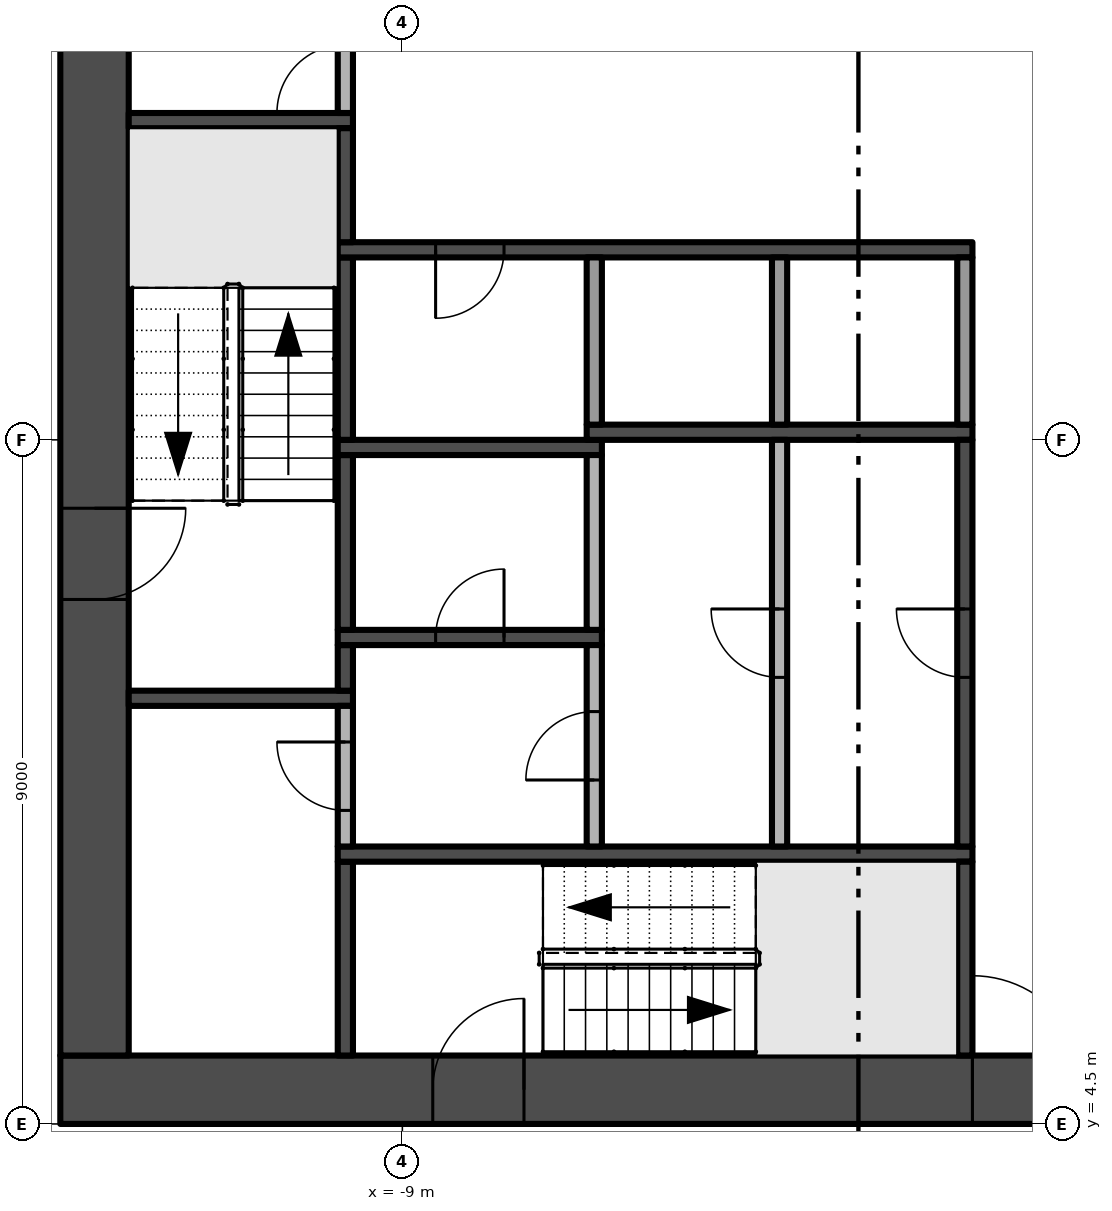
"""IFC4 building model, lengths in metres.
Left out: names, types, materials, properties, quantities, classifications, styles, units other than length and angle.
Written with IfcOpenShell. Run it as: python <this file> out.ifc"""

import sys

from ifc_helpers import new_model, si_unit, direction, frame, frame_2d, origin, place, context, subcontext, project, spatial, rectangle, extrude, element, fill, save


model = new_model("IFC4")
c1 = context("Model", 3, precision=1e-05, world=origin(), true_north=direction((0.0, 1.0)))
c2 = subcontext(c1, "Body", "Model", "MODEL_VIEW")
j1 = project(units=[si_unit("LENGTHUNIT", "METRE"), si_unit("PLANEANGLEUNIT", "RADIAN")], contexts=[c1])
p1 = place(None, origin())
s1 = spatial("IfcSite", under=j1, at=p1, CompositionType="ELEMENT")
p2 = place(p1, origin())
s2 = spatial("IfcBuilding", under=s1, at=p2, CompositionType="ELEMENT")
p3 = place(p2, frame((0.0, 0.0, 41.6)))
s3 = spatial("IfcBuildingStorey", under=s2, at=p3, CompositionType="ELEMENT", Elevation=41.6)
p4 = place(p3, frame((-13.5, 4.95, -0.3), z_axis=(0.0, 0.0, 1.0), x_axis=(1.0, 0.0, 0.0)))
e1 = element("IfcWall", 1, at=p4, inside=s3, PredefinedType="SHEAR", context=c2, shape_type="SweptSolid", body=[
    extrude(rectangle(XDim=27.0, YDim=0.9, at=frame_2d((13.5, 0.0))), origin(), (0.0, 0.0, 1.0), 3.8),
])
p5 = place(p4, frame((12.0, 0.0, 0.3)))
e2 = element("IfcOpeningElement", 2, at=p5, cuts=e1, PredefinedType="OPENING", context=c2, shape_type="SweptSolid", body=[
    extrude(rectangle(XDim=3.0, YDim=2.4, at=frame_2d((1.5, 1.2))), frame((0.0, 0.46, 0.0), z_axis=(0.0, -1.0, 0.0), x_axis=(1.0, 0.0, 0.0)), (0.0, 0.0, 1.0), 0.92),
])
p6 = place(p4, frame((4.9, 0.0, 0.3)))
e3 = element("IfcOpeningElement", 3, at=p6, cuts=e1, PredefinedType="OPENING", context=c2, shape_type="SweptSolid", body=[
    extrude(rectangle(XDim=1.2, YDim=2.2, at=frame_2d((0.6, 1.1))), frame((0.0, 0.46, 0.0), z_axis=(0.0, -1.0, 0.0), x_axis=(1.0, 0.0, 0.0)), (0.0, 0.0, 1.0), 0.92),
])
p7 = place(p4, frame((20.75, 0.0, 0.3)))
e4 = element("IfcOpeningElement", 4, at=p7, cuts=e1, PredefinedType="OPENING", context=c2, shape_type="SweptSolid", body=[
    extrude(rectangle(XDim=1.5, YDim=2.2, at=frame_2d((0.75, 1.1))), frame((0.0, 0.46, 0.0), z_axis=(0.0, -1.0, 0.0), x_axis=(1.0, 0.0, 0.0)), (0.0, 0.0, 1.0), 0.92),
])
p8 = place(p4, frame((17.4, 0.0, 0.3)))
e5 = element("IfcOpeningElement", 5, at=p8, cuts=e1, PredefinedType="OPENING", context=c2, shape_type="SweptSolid", body=[
    extrude(rectangle(XDim=1.2, YDim=2.2, at=frame_2d((0.6, 1.1))), frame((0.0, 0.46, 0.0), z_axis=(0.0, -1.0, 0.0), x_axis=(1.0, 0.0, 0.0)), (0.0, 0.0, 1.0), 0.92),
])
p9 = place(p3, frame((-13.05, 21.6, -0.3), z_axis=(0.0, 0.0, 1.0), x_axis=(0.0, -1.0, 0.0)))
e6 = element("IfcWall", 6, at=p9, inside=s3, PredefinedType="SHEAR", context=c2, shape_type="SweptSolid", body=[
    extrude(rectangle(XDim=16.2, YDim=0.9, at=frame_2d((8.1, 0.0))), origin(), (0.0, 0.0, 1.0), 3.8),
])
p10 = place(p9, frame((9.0, 0.0, 0.3)))
e7 = element("IfcOpeningElement", 7, at=p10, cuts=e6, PredefinedType="OPENING", context=c2, shape_type="SweptSolid", body=[
    extrude(rectangle(XDim=1.2, YDim=2.2, at=frame_2d((0.6, 1.1))), frame((0.0, 0.46, 0.0), z_axis=(0.0, -1.0, 0.0), x_axis=(1.0, 0.0, 0.0)), (0.0, 0.0, 1.0), 0.92),
])
for number, where, z_axis, x_axis in (
    (8, (-12.6, 10.1, 0.0), (0.0, 0.0, 1.0), (1.0, 0.0, 0.0)),
    (9, (-12.6, 17.7, 0.0), (0.0, 0.0, 1.0), (1.0, 0.0, 0.0)),
):
    element("IfcWall", number, at=place(p3, frame(where, z_axis=z_axis, x_axis=x_axis)), inside=s3, PredefinedType="SHEAR", context=c2, shape_type="SweptSolid", body=[
        extrude(rectangle(XDim=2.95, YDim=0.2, at=frame_2d((1.475, 0.0))), origin(), (0.0, 0.0, 1.0), 3.5),
    ])
p11 = place(p3, frame((-9.75, 5.4, 0.0), z_axis=(0.0, 0.0, 1.0), x_axis=(0.0, 1.0, 0.0)))
e10 = element("IfcWall", 10, at=p11, inside=s3, PredefinedType="SHEAR", context=c2, shape_type="SweptSolid", body=[
    extrude(rectangle(XDim=2.55, YDim=0.2, at=frame_2d((1.275, 0.0))), origin(), (0.0, 0.0, 1.0), 3.5),
])
p12 = place(p3, frame((-9.85, 8.05, 0.0), z_axis=(0.0, 0.0, 1.0), x_axis=(1.0, 0.0, 0.0)))
e11 = element("IfcWall", 11, at=p12, inside=s3, PredefinedType="SHEAR", context=c2, shape_type="SweptSolid", body=[
    extrude(rectangle(XDim=8.35, YDim=0.2, at=frame_2d((4.175, 0.0))), origin(), (0.0, 0.0, 1.0), 3.5),
])
p13 = place(p3, frame((-9.75, 8.15, 0.0), z_axis=(0.0, 0.0, 1.0), x_axis=(0.0, 1.0, 0.0)))
e12 = element("IfcWall", 12, at=p13, inside=s3, PredefinedType="PARTITIONING", context=c2, shape_type="SweptSolid", body=[
    extrude(rectangle(XDim=1.85, YDim=0.2, at=frame_2d((0.925, 0.0))), origin(), (0.0, 0.0, 1.0), 3.5),
])
p14 = place(p13, frame((0.475, 0.0, 0.0)))
e13 = element("IfcOpeningElement", 13, at=p14, cuts=e12, PredefinedType="OPENING", context=c2, shape_type="SweptSolid", body=[
    extrude(rectangle(XDim=0.9, YDim=2.1, at=frame_2d((0.45, 1.05))), frame((0.0, 0.11, 0.0), z_axis=(0.0, -1.0, 0.0), x_axis=(1.0, 0.0, 0.0)), (0.0, 0.0, 1.0), 0.22),
])
p15 = place(p3, frame((-9.75, 10.2, 0.0), z_axis=(0.0, 0.0, 1.0), x_axis=(0.0, 1.0, 0.0)))
e14 = element("IfcWall", 14, at=p15, inside=s3, PredefinedType="SHEAR", context=c2, shape_type="SweptSolid", body=[
    extrude(rectangle(XDim=0.6, YDim=0.2, at=frame_2d((0.3, 0.0))), origin(), (0.0, 0.0, 1.0), 3.5),
])
p16 = place(p3, frame((-9.85, 10.9, 0.0), z_axis=(0.0, 0.0, 1.0), x_axis=(1.0, 0.0, 0.0)))
e15 = element("IfcWall", 15, at=p16, inside=s3, PredefinedType="SHEAR", context=c2, shape_type="SweptSolid", body=[
    extrude(rectangle(XDim=3.475, YDim=0.2, at=frame_2d((1.738, 0.0))), origin(), (0.0, 0.0, 1.0), 3.5),
])
p17 = place(p16, frame((1.288, 0.0, 0.0)))
e16 = element("IfcOpeningElement", 16, at=p17, cuts=e15, PredefinedType="OPENING", context=c2, shape_type="SweptSolid", body=[
    extrude(rectangle(XDim=0.9, YDim=2.1, at=frame_2d((0.45, 1.05))), frame((0.0, 0.11, 0.0), z_axis=(0.0, -1.0, 0.0), x_axis=(1.0, 0.0, 0.0)), (0.0, 0.0, 1.0), 0.22),
])
p18 = place(p3, frame((-9.75, 11.0, 0.0), z_axis=(0.0, 0.0, 1.0), x_axis=(0.0, 1.0, 0.0)))
e17 = element("IfcWall", 17, at=p18, inside=s3, PredefinedType="SHEAR", context=c2, shape_type="SweptSolid", body=[
    extrude(rectangle(XDim=2.3, YDim=0.2, at=frame_2d((1.15, 0.0))), origin(), (0.0, 0.0, 1.0), 3.5),
])
p19 = place(p3, frame((-9.85, 13.4, 0.0), z_axis=(0.0, 0.0, 1.0), x_axis=(1.0, 0.0, 0.0)))
e18 = element("IfcWall", 18, at=p19, inside=s3, PredefinedType="SHEAR", context=c2, shape_type="SweptSolid", body=[
    extrude(rectangle(XDim=3.475, YDim=0.2, at=frame_2d((1.738, 0.0))), origin(), (0.0, 0.0, 1.0), 3.5),
])
p20 = place(p3, frame((-9.75, 13.5, 0.0), z_axis=(0.0, 0.0, 1.0), x_axis=(0.0, 1.0, 0.0)))
e19 = element("IfcWall", 19, at=p20, inside=s3, PredefinedType="SHEAR", context=c2, shape_type="SweptSolid", body=[
    extrude(rectangle(XDim=2.4, YDim=0.2, at=frame_2d((1.2, 0.0))), origin(), (0.0, 0.0, 1.0), 3.5),
])
p21 = place(p3, frame((-1.5, 16.0, 0.0), z_axis=(0.0, 0.0, 1.0), x_axis=(-1.0, 0.0, 0.0)))
e20 = element("IfcWall", 20, at=p21, inside=s3, PredefinedType="SHEAR", context=c2, shape_type="SweptSolid", body=[
    extrude(rectangle(XDim=8.35, YDim=0.2, at=frame_2d((4.175, 0.0))), origin(), (0.0, 0.0, 1.0), 3.5),
])
p22 = place(p21, frame((6.162, 0.0, 0.0)))
e21 = element("IfcOpeningElement", 21, at=p22, cuts=e20, PredefinedType="OPENING", context=c2, shape_type="SweptSolid", body=[
    extrude(rectangle(XDim=0.9, YDim=2.1, at=frame_2d((0.45, 1.05))), frame((0.0, 0.11, 0.0), z_axis=(0.0, -1.0, 0.0), x_axis=(1.0, 0.0, 0.0)), (0.0, 0.0, 1.0), 0.22),
])
p23 = place(p3, frame((-9.75, 16.1, 0.0), z_axis=(0.0, 0.0, 1.0), x_axis=(0.0, 1.0, 0.0)))
e22 = element("IfcWall", 22, at=p23, inside=s3, PredefinedType="SHEAR", context=c2, shape_type="SweptSolid", body=[
    extrude(rectangle(XDim=1.5, YDim=0.2, at=frame_2d((0.75, 0.0))), origin(), (0.0, 0.0, 1.0), 3.5),
])
p24 = place(p3, frame((-9.75, 17.8, 0.0), z_axis=(0.0, 0.0, 1.0), x_axis=(0.0, 1.0, 0.0)))
e23 = element("IfcWall", 23, at=p24, inside=s3, PredefinedType="PARTITIONING", context=c2, shape_type="SweptSolid", body=[
    extrude(rectangle(XDim=1.4, YDim=0.2, at=frame_2d((0.7, 0.0))), origin(), (0.0, 0.0, 1.0), 3.5),
])
p25 = place(p24, origin())
e24 = element("IfcOpeningElement", 24, at=p25, cuts=e23, PredefinedType="OPENING", context=c2, shape_type="SweptSolid", body=[
    extrude(rectangle(XDim=0.9, YDim=2.1, at=frame_2d((0.45, 1.05))), frame((0.0, 0.11, 0.0), z_axis=(0.0, -1.0, 0.0), x_axis=(1.0, 0.0, 0.0)), (0.0, 0.0, 1.0), 0.22),
])
p26 = place(p3, frame((-6.475, 8.15, 0.0), z_axis=(0.0, 0.0, 1.0), x_axis=(0.0, 1.0, 0.0)))
e25 = element("IfcWall", 25, at=p26, inside=s3, PredefinedType="PARTITIONING", context=c2, shape_type="SweptSolid", body=[
    extrude(rectangle(XDim=2.65, YDim=0.2, at=frame_2d((1.325, 0.0))), origin(), (0.0, 0.0, 1.0), 3.5),
])
p27 = place(p26, frame((0.875, 0.0, 0.0)))
e26 = element("IfcOpeningElement", 26, at=p27, cuts=e25, PredefinedType="OPENING", context=c2, shape_type="SweptSolid", body=[
    extrude(rectangle(XDim=0.9, YDim=2.1, at=frame_2d((0.45, 1.05))), frame((0.0, 0.11, 0.0), z_axis=(0.0, -1.0, 0.0), x_axis=(1.0, 0.0, 0.0)), (0.0, 0.0, 1.0), 0.22),
])
p28 = place(p3, frame((-6.475, 11.0, 0.0), z_axis=(0.0, 0.0, 1.0), x_axis=(0.0, 1.0, 0.0)))
e27 = element("IfcWall", 27, at=p28, inside=s3, PredefinedType="PARTITIONING", context=c2, shape_type="SweptSolid", body=[
    extrude(rectangle(XDim=2.3, YDim=0.2, at=frame_2d((1.15, 0.0))), origin(), (0.0, 0.0, 1.0), 3.5),
])
p29 = place(p3, frame((-6.575, 13.6, 0.0), z_axis=(0.0, 0.0, 1.0), x_axis=(1.0, 0.0, 0.0)))
e28 = element("IfcWall", 28, at=p29, inside=s3, PredefinedType="SHEAR", context=c2, shape_type="SweptSolid", body=[
    extrude(rectangle(XDim=5.075, YDim=0.2, at=frame_2d((2.538, 0.0))), origin(), (0.0, 0.0, 1.0), 3.5),
])
p30 = place(p3, frame((-6.475, 13.7, 0.0), z_axis=(0.0, 0.0, 1.0), x_axis=(0.0, 1.0, 0.0)))
e29 = element("IfcWall", 29, at=p30, inside=s3, PredefinedType="PARTITIONING", context=c2, shape_type="SweptSolid", body=[
    extrude(rectangle(XDim=2.2, YDim=0.2, at=frame_2d((1.1, 0.0))), origin(), (0.0, 0.0, 1.0), 3.5),
])
p31 = place(p3, frame((-4.037, 8.15, 0.0), z_axis=(0.0, 0.0, 1.0), x_axis=(0.0, 1.0, 0.0)))
e30 = element("IfcWall", 30, at=p31, inside=s3, PredefinedType="PARTITIONING", context=c2, shape_type="SweptSolid", body=[
    extrude(rectangle(XDim=5.35, YDim=0.2, at=frame_2d((2.675, 0.0))), origin(), (0.0, 0.0, 1.0), 3.5),
])
p32 = place(p31, frame((2.225, 0.0, 0.0)))
e31 = element("IfcOpeningElement", 31, at=p32, cuts=e30, PredefinedType="OPENING", context=c2, shape_type="SweptSolid", body=[
    extrude(rectangle(XDim=0.9, YDim=2.1, at=frame_2d((0.45, 1.05))), frame((0.0, 0.11, 0.0), z_axis=(0.0, -1.0, 0.0), x_axis=(1.0, 0.0, 0.0)), (0.0, 0.0, 1.0), 0.22),
])
p33 = place(p3, frame((-4.037, 13.7, 0.0), z_axis=(0.0, 0.0, 1.0), x_axis=(0.0, 1.0, 0.0)))
e32 = element("IfcWall", 32, at=p33, inside=s3, PredefinedType="PARTITIONING", context=c2, shape_type="SweptSolid", body=[
    extrude(rectangle(XDim=2.2, YDim=0.2, at=frame_2d((1.1, 0.0))), origin(), (0.0, 0.0, 1.0), 3.5),
])
p34 = place(p3, frame((-1.6, 5.4, 0.0), z_axis=(0.0, 0.0, 1.0), x_axis=(0.0, 1.0, 0.0)))
e33 = element("IfcWall", 33, at=p34, inside=s3, PredefinedType="SHEAR", context=c2, shape_type="SweptSolid", body=[
    extrude(rectangle(XDim=2.55, YDim=0.2, at=frame_2d((1.275, 0.0))), origin(), (0.0, 0.0, 1.0), 3.5),
])
p35 = place(p3, frame((-1.6, 8.15, 0.0), z_axis=(0.0, 0.0, 1.0), x_axis=(0.0, 1.0, 0.0)))
e34 = element("IfcWall", 34, at=p35, inside=s3, PredefinedType="SHEAR", context=c2, shape_type="SweptSolid", body=[
    extrude(rectangle(XDim=5.35, YDim=0.2, at=frame_2d((2.675, 0.0))), origin(), (0.0, 0.0, 1.0), 3.5),
])
p36 = place(p35, frame((2.225, 0.0, 0.0)))
e35 = element("IfcOpeningElement", 35, at=p36, cuts=e34, PredefinedType="OPENING", context=c2, shape_type="SweptSolid", body=[
    extrude(rectangle(XDim=0.9, YDim=2.1, at=frame_2d((0.45, 1.05))), frame((0.0, 0.11, 0.0), z_axis=(0.0, -1.0, 0.0), x_axis=(1.0, 0.0, 0.0)), (0.0, 0.0, 1.0), 0.22),
])
p37 = place(p3, frame((-1.6, 13.7, 0.0), z_axis=(0.0, 0.0, 1.0), x_axis=(0.0, 1.0, 0.0)))
e36 = element("IfcWall", 36, at=p37, inside=s3, PredefinedType="PARTITIONING", context=c2, shape_type="SweptSolid", body=[
    extrude(rectangle(XDim=2.2, YDim=0.2, at=frame_2d((1.1, 0.0))), origin(), (0.0, 0.0, 1.0), 3.5),
])
p38 = place(p5, frame((3.0, 0.0, 0.0), z_axis=(0.0, 0.0, 1.0), x_axis=(-1.0, 0.0, 0.0)))
e37 = element("IfcDoor", 37, at=p38, inside=s3, OperationType="DOUBLE_DOOR_SINGLE_SWING", PredefinedType="DOOR", context=c2, shape_type="SweptSolid", body=[
    extrude(rectangle(XDim=3.0, YDim=2.4, at=frame_2d((1.5, 1.2))), frame((0.0, 0.025, 0.0), z_axis=(0.0, -1.0, 0.0), x_axis=(1.0, 0.0, 0.0)), (0.0, 0.0, 1.0), 0.05),
])
fill(e2, e37)
p39 = place(p10, frame((1.2, 0.0, 0.0), z_axis=(0.0, 0.0, 1.0), x_axis=(-1.0, 0.0, 0.0)))
e38 = element("IfcDoor", 38, at=p39, inside=s3, OperationType="SINGLE_SWING_RIGHT", PredefinedType="DOOR", context=c2, shape_type="SweptSolid", body=[
    extrude(rectangle(XDim=1.2, YDim=2.2, at=frame_2d((0.6, 1.1))), frame((0.0, 0.025, 0.0), z_axis=(0.0, -1.0, 0.0), x_axis=(1.0, 0.0, 0.0)), (0.0, 0.0, 1.0), 0.05),
])
fill(e7, e38)
p40 = place(p6, frame((1.2, 0.0, 0.0), z_axis=(0.0, 0.0, 1.0), x_axis=(-1.0, 0.0, 0.0)))
e39 = element("IfcDoor", 39, at=p40, inside=s3, OperationType="SINGLE_SWING_LEFT", PredefinedType="DOOR", context=c2, shape_type="SweptSolid", body=[
    extrude(rectangle(XDim=1.2, YDim=2.2, at=frame_2d((0.6, 1.1))), frame((0.0, 0.025, 0.0), z_axis=(0.0, -1.0, 0.0), x_axis=(1.0, 0.0, 0.0)), (0.0, 0.0, 1.0), 0.05),
])
fill(e3, e39)
p41 = place(p22, origin())
e40 = element("IfcDoor", 40, at=p41, inside=s3, OperationType="SINGLE_SWING_RIGHT", PredefinedType="DOOR", context=c2, shape_type="SweptSolid", body=[
    extrude(rectangle(XDim=0.9, YDim=2.1, at=frame_2d((0.45, 1.05))), frame((0.0, 0.025, 0.0), z_axis=(0.0, -1.0, 0.0), x_axis=(1.0, 0.0, 0.0)), (0.0, 0.0, 1.0), 0.05),
])
fill(e21, e40)
p42 = place(p36, origin())
e41 = element("IfcDoor", 41, at=p42, inside=s3, OperationType="SINGLE_SWING_RIGHT", PredefinedType="DOOR", context=c2, shape_type="SweptSolid", body=[
    extrude(rectangle(XDim=0.9, YDim=2.1, at=frame_2d((0.45, 1.05))), frame((0.0, 0.025, 0.0), z_axis=(0.0, -1.0, 0.0), x_axis=(1.0, 0.0, 0.0)), (0.0, 0.0, 1.0), 0.05),
])
fill(e35, e41)
p43 = place(p25, origin())
e42 = element("IfcDoor", 42, at=p43, inside=s3, OperationType="SINGLE_SWING_LEFT", PredefinedType="DOOR", context=c2, shape_type="SweptSolid", body=[
    extrude(rectangle(XDim=0.9, YDim=2.1, at=frame_2d((0.45, 1.05))), frame((0.0, 0.025, 0.0), z_axis=(0.0, -1.0, 0.0), x_axis=(1.0, 0.0, 0.0)), (0.0, 0.0, 1.0), 0.05),
])
fill(e24, e42)
p44 = place(p32, origin())
e43 = element("IfcDoor", 43, at=p44, inside=s3, OperationType="SINGLE_SWING_RIGHT", PredefinedType="DOOR", context=c2, shape_type="SweptSolid", body=[
    extrude(rectangle(XDim=0.9, YDim=2.1, at=frame_2d((0.45, 1.05))), frame((0.0, 0.025, 0.0), z_axis=(0.0, -1.0, 0.0), x_axis=(1.0, 0.0, 0.0)), (0.0, 0.0, 1.0), 0.05),
])
fill(e31, e43)
p45 = place(p27, origin())
e44 = element("IfcDoor", 44, at=p45, inside=s3, OperationType="SINGLE_SWING_LEFT", PredefinedType="DOOR", context=c2, shape_type="SweptSolid", body=[
    extrude(rectangle(XDim=0.9, YDim=2.1, at=frame_2d((0.45, 1.05))), frame((0.0, 0.025, 0.0), z_axis=(0.0, -1.0, 0.0), x_axis=(1.0, 0.0, 0.0)), (0.0, 0.0, 1.0), 0.05),
])
fill(e26, e44)
p46 = place(p17, origin())
e45 = element("IfcDoor", 45, at=p46, inside=s3, OperationType="SINGLE_SWING_RIGHT", PredefinedType="DOOR", context=c2, shape_type="SweptSolid", body=[
    extrude(rectangle(XDim=0.9, YDim=2.1, at=frame_2d((0.45, 1.05))), frame((0.0, 0.025, 0.0), z_axis=(0.0, -1.0, 0.0), x_axis=(1.0, 0.0, 0.0)), (0.0, 0.0, 1.0), 0.05),
])
fill(e16, e45)
p47 = place(p14, origin())
e46 = element("IfcDoor", 46, at=p47, inside=s3, OperationType="SINGLE_SWING_RIGHT", PredefinedType="DOOR", context=c2, shape_type="SweptSolid", body=[
    extrude(rectangle(XDim=0.9, YDim=2.1, at=frame_2d((0.45, 1.05))), frame((0.0, 0.025, 0.0), z_axis=(0.0, -1.0, 0.0), x_axis=(1.0, 0.0, 0.0)), (0.0, 0.0, 1.0), 0.05),
])
fill(e13, e46)
save(model, sys.argv[1])
